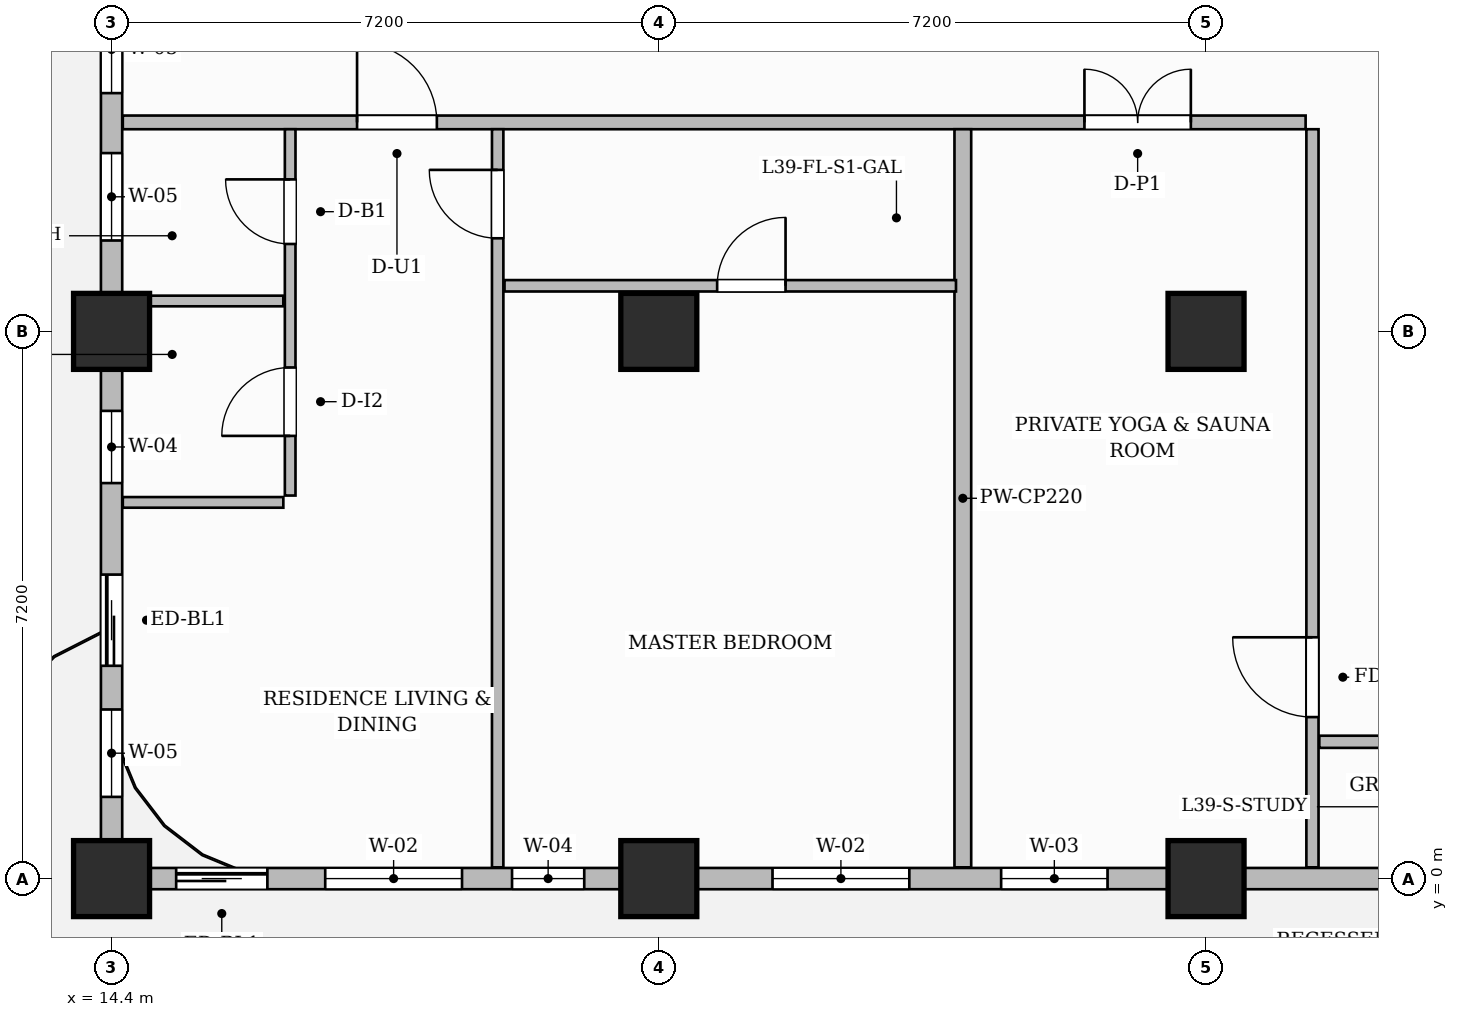
"""IFC4 building model, lengths in metres.
Left out: names, types, materials, properties, quantities, classifications, styles, units other than length and angle.
Written with IfcOpenShell. Run it as: python <this file> out.ifc"""

import sys

from ifc_helpers import new_model, si_unit, direction, frame, frame_2d, origin, origin_2d, place, context, subcontext, project, spatial, rectangle, extrude, source, transform, mapped, element, fill, save


model = new_model("IFC4")
c1 = context("Model", 3, precision=1e-05, world=origin(), true_north=direction((0.0, 1.0)))
c2 = subcontext(c1, "Body", "Model", "MODEL_VIEW")
j1 = project(units=[si_unit("LENGTHUNIT", "METRE"), si_unit("PLANEANGLEUNIT", "RADIAN")], contexts=[c1])
p1 = place(None, origin())
s1 = spatial("IfcSite", under=j1, at=p1, CompositionType="ELEMENT")
p2 = place(p1, origin())
s2 = spatial("IfcBuilding", under=s1, at=p2, CompositionType="ELEMENT")
p3 = place(p2, frame((0.0, 0.0, 158.0)))
s3 = spatial("IfcBuildingStorey", under=s2, at=p3, CompositionType="ELEMENT", Elevation=158.0)
m1 = source(origin(), c2, "Body", "SweptSolid", [
    extrude(rectangle(XDim=1.0, YDim=1.0, at=origin_2d()), origin(), (0.0, 0.0, 1.0), 3.85),
])
for number, where, z_axis, x_axis in (
    (1, (14.4, 0.0, 0.0), (0.0, 0.0, 1.0), (1.0, 0.0, 0.0)),
    (2, (14.4, 7.2, 0.0), (0.0, 0.0, 1.0), (1.0, 0.0, 0.0)),
    (3, (21.6, 0.0, 0.0), (0.0, 0.0, 1.0), (1.0, 0.0, 0.0)),
    (4, (21.6, 7.2, 0.0), (0.0, 0.0, 1.0), (1.0, 0.0, 0.0)),
    (5, (28.8, 0.0, 0.0), (0.0, 0.0, 1.0), (1.0, 0.0, 0.0)),
    (6, (28.8, 7.2, 0.0), (0.0, 0.0, 1.0), (1.0, 0.0, 0.0)),
):
    element("IfcColumn", number, at=place(p3, frame(where, z_axis=z_axis, x_axis=x_axis)), inside=s3, PredefinedType="COLUMN", context=c2, shape_type="MappedRepresentation", body=[
        mapped(m1, transform((0.0, 0.0, 0.0), scale=1.0)),
    ])
p4 = place(p3, frame((14.548, 9.95, 0.0), z_axis=(0.0, 0.0, 1.0), x_axis=(1.0, 0.0, 0.0)))
e7 = element("IfcWall", 7, at=p4, inside=s3, PredefinedType="PARTITIONING", context=c2, shape_type="SweptSolid", body=[
    extrude(rectangle(XDim=15.562, YDim=0.18, at=frame_2d((7.781, 0.0))), origin(), (0.0, 0.0, 1.0), 3.6),
])
p5 = place(p4, frame((3.082, 0.0, 0.0)))
e8 = element("IfcOpeningElement", 8, at=p5, cuts=e7, PredefinedType="OPENING", context=c2, shape_type="SweptSolid", body=[
    extrude(rectangle(XDim=1.05, YDim=2.25, at=frame_2d((0.525, 1.125))), frame((0.0, 0.1, 0.0), z_axis=(0.0, -1.0, 0.0), x_axis=(1.0, 0.0, 0.0)), (0.0, 0.0, 1.0), 0.2),
])
p6 = place(p4, frame((12.652, 0.0, 0.0)))
e9 = element("IfcOpeningElement", 9, at=p6, cuts=e7, PredefinedType="OPENING", context=c2, shape_type="SweptSolid", body=[
    extrude(rectangle(XDim=1.4, YDim=2.35, at=frame_2d((0.7, 1.175))), frame((0.0, 0.1, 0.0), z_axis=(0.0, -1.0, 0.0), x_axis=(1.0, 0.0, 0.0)), (0.0, 0.0, 1.0), 0.2),
])
p7 = place(p3, frame((30.2, 0.148, 0.0), z_axis=(0.0, 0.0, 1.0), x_axis=(0.0, 1.0, 0.0)))
e10 = element("IfcWall", 10, at=p7, inside=s3, PredefinedType="PARTITIONING", context=c2, shape_type="SweptSolid", body=[
    extrude(rectangle(XDim=9.712, YDim=0.16, at=frame_2d((4.856, 0.0))), origin(), (0.0, 0.0, 1.0), 3.6),
])
p8 = place(p7, frame((1.977, 0.0, 0.0)))
e11 = element("IfcOpeningElement", 11, at=p8, cuts=e10, PredefinedType="OPENING", context=c2, shape_type="SweptSolid", body=[
    extrude(rectangle(XDim=1.05, YDim=2.15, at=frame_2d((0.525, 1.075))), frame((0.0, 0.09, 0.0), z_axis=(0.0, -1.0, 0.0), x_axis=(1.0, 0.0, 0.0)), (0.0, 0.0, 1.0), 0.18),
])
p9 = place(p3, frame((30.29, 1.8, 0.0), z_axis=(0.0, 0.0, 1.0), x_axis=(1.0, 0.0, 0.0)))
e12 = element("IfcWall", 12, at=p9, inside=s3, PredefinedType="PARTITIONING", context=c2, shape_type="SweptSolid", body=[
    extrude(rectangle(XDim=19.37, YDim=0.16, at=frame_2d((9.685, 0.0))), origin(), (0.0, 0.0, 1.0), 3.6),
])
p10 = place(p9, frame((5.074, 0.0, 0.0)))
e13 = element("IfcOpeningElement", 13, at=p10, cuts=e12, PredefinedType="OPENING", context=c2, shape_type="SweptSolid", body=[
    extrude(rectangle(XDim=0.9, YDim=2.15, at=frame_2d((0.45, 1.075))), frame((0.0, 0.09, 0.0), z_axis=(0.0, -1.0, 0.0), x_axis=(1.0, 0.0, 0.0)), (0.0, 0.0, 1.0), 0.18),
])
p11 = place(p9, frame((14.06, 0.0, 0.0)))
e14 = element("IfcOpeningElement", 14, at=p11, cuts=e12, PredefinedType="OPENING", context=c2, shape_type="SweptSolid", body=[
    extrude(rectangle(XDim=0.9, YDim=2.15, at=frame_2d((0.45, 1.075))), frame((0.0, 0.09, 0.0), z_axis=(0.0, -1.0, 0.0), x_axis=(1.0, 0.0, 0.0)), (0.0, 0.0, 1.0), 0.18),
])
p12 = place(p3, frame((25.6, 0.148, 0.0), z_axis=(0.0, 0.0, 1.0), x_axis=(0.0, 1.0, 0.0)))
e15 = element("IfcWall", 15, at=p12, inside=s3, PredefinedType="PARTITIONING", context=c2, shape_type="SweptSolid", body=[
    extrude(rectangle(XDim=9.712, YDim=0.22, at=frame_2d((4.856, 0.0))), origin(), (0.0, 0.0, 1.0), 3.6),
])
p13 = place(p3, frame((16.75, 5.04, 0.0), z_axis=(0.0, 0.0, 1.0), x_axis=(0.0, 1.0, 0.0)))
e16 = element("IfcWall", 16, at=p13, inside=s3, PredefinedType="PARTITIONING", context=c2, shape_type="SweptSolid", body=[
    extrude(rectangle(XDim=4.82, YDim=0.14, at=frame_2d((2.41, 0.0))), origin(), (0.0, 0.0, 1.0), 3.6),
])
p14 = place(p13, frame((0.785, 0.0, 0.0)))
e17 = element("IfcOpeningElement", 17, at=p14, cuts=e16, PredefinedType="OPENING", context=c2, shape_type="SweptSolid", body=[
    extrude(rectangle(XDim=0.9, YDim=2.15, at=frame_2d((0.45, 1.075))), frame((0.0, 0.08, 0.0), z_axis=(0.0, -1.0, 0.0), x_axis=(1.0, 0.0, 0.0)), (0.0, 0.0, 1.0), 0.16),
])
p15 = place(p13, frame((3.31, 0.0, 0.0)))
e18 = element("IfcOpeningElement", 18, at=p15, cuts=e16, PredefinedType="OPENING", context=c2, shape_type="SweptSolid", body=[
    extrude(rectangle(XDim=0.85, YDim=2.1, at=frame_2d((0.425, 1.05))), frame((0.0, 0.08, 0.0), z_axis=(0.0, -1.0, 0.0), x_axis=(1.0, 0.0, 0.0)), (0.0, 0.0, 1.0), 0.16),
])
p16 = place(p3, frame((14.59, 7.6, 0.0), z_axis=(0.0, 0.0, 1.0), x_axis=(1.0, 0.0, 0.0)))
e19 = element("IfcWall", 19, at=p16, inside=s3, PredefinedType="PARTITIONING", context=c2, shape_type="SweptSolid", body=[
    extrude(rectangle(XDim=2.07, YDim=0.14, at=frame_2d((1.035, 0.0))), origin(), (0.0, 0.0, 1.0), 3.6),
])
p17 = place(p3, frame((14.548, 4.95, 0.0), z_axis=(0.0, 0.0, 1.0), x_axis=(1.0, 0.0, 0.0)))
e20 = element("IfcWall", 20, at=p17, inside=s3, PredefinedType="PARTITIONING", context=c2, shape_type="SweptSolid", body=[
    extrude(rectangle(XDim=2.112, YDim=0.14, at=frame_2d((1.056, 0.0))), origin(), (0.0, 0.0, 1.0), 3.6),
])
p18 = place(p3, frame((19.48, 0.148, 0.0), z_axis=(0.0, 0.0, 1.0), x_axis=(0.0, 1.0, 0.0)))
e21 = element("IfcWall", 21, at=p18, inside=s3, PredefinedType="PARTITIONING", context=c2, shape_type="SweptSolid", body=[
    extrude(rectangle(XDim=9.712, YDim=0.15, at=frame_2d((4.856, 0.0))), origin(), (0.0, 0.0, 1.0), 3.6),
])
p19 = place(p18, frame((8.277, 0.0, 0.0)))
e22 = element("IfcOpeningElement", 22, at=p19, cuts=e21, PredefinedType="OPENING", context=c2, shape_type="SweptSolid", body=[
    extrude(rectangle(XDim=0.9, YDim=2.15, at=frame_2d((0.45, 1.075))), frame((0.0, 0.085, 0.0), z_axis=(0.0, -1.0, 0.0), x_axis=(1.0, 0.0, 0.0)), (0.0, 0.0, 1.0), 0.17),
])
p20 = place(p3, frame((19.57, 7.8, 0.0), z_axis=(0.0, 0.0, 1.0), x_axis=(1.0, 0.0, 0.0)))
e23 = element("IfcWall", 23, at=p20, inside=s3, PredefinedType="PARTITIONING", context=c2, shape_type="SweptSolid", body=[
    extrude(rectangle(XDim=5.94, YDim=0.15, at=frame_2d((2.97, 0.0))), origin(), (0.0, 0.0, 1.0), 3.6),
])
p21 = place(p20, frame((2.798, 0.0, 0.0)))
e24 = element("IfcOpeningElement", 24, at=p21, cuts=e23, PredefinedType="OPENING", context=c2, shape_type="SweptSolid", body=[
    extrude(rectangle(XDim=0.9, YDim=2.15, at=frame_2d((0.45, 1.075))), frame((0.0, 0.085, 0.0), z_axis=(0.0, -1.0, 0.0), x_axis=(1.0, 0.0, 0.0)), (0.0, 0.0, 1.0), 0.17),
])
p22 = place(p3, frame((14.4, 0.0, 0.0), z_axis=(0.0, 0.0, 1.0), x_axis=(1.0, 0.0, 0.0)))
e25 = element("IfcWall", 25, at=p22, inside=s3, PredefinedType="SOLIDWALL", context=c2, shape_type="SweptSolid", body=[
    extrude(rectangle(XDim=35.4, YDim=0.28, at=frame_2d((17.7, 0.0))), origin(), (0.0, 0.0, 1.0), 3.085),
])
p23 = place(p22, frame((0.85, 0.0, 0.0)))
e26 = element("IfcOpeningElement", 26, at=p23, cuts=e25, PredefinedType="OPENING", context=c2, shape_type="SweptSolid", body=[
    extrude(rectangle(XDim=1.2, YDim=2.2, at=frame_2d((0.6, 1.1))), frame((0.0, 0.15, 0.0), z_axis=(0.0, -1.0, 0.0), x_axis=(1.0, 0.0, 0.0)), (0.0, 0.0, 1.0), 0.3),
])
p24 = place(p22, frame((2.811, 0.0, 0.8)))
e27 = element("IfcOpeningElement", 27, at=p24, cuts=e25, PredefinedType="OPENING", context=c2, shape_type="SweptSolid", body=[
    extrude(rectangle(XDim=1.8, YDim=1.85, at=frame_2d((0.9, 0.925))), frame((0.0, 0.15, 0.0), z_axis=(0.0, -1.0, 0.0), x_axis=(1.0, 0.0, 0.0)), (0.0, 0.0, 1.0), 0.3),
])
p25 = place(p22, frame((5.269, 0.0, 0.8)))
e28 = element("IfcOpeningElement", 28, at=p25, cuts=e25, PredefinedType="OPENING", context=c2, shape_type="SweptSolid", body=[
    extrude(rectangle(XDim=0.95, YDim=1.75, at=frame_2d((0.475, 0.875))), frame((0.0, 0.15, 0.0), z_axis=(0.0, -1.0, 0.0), x_axis=(1.0, 0.0, 0.0)), (0.0, 0.0, 1.0), 0.3),
])
p26 = place(p22, frame((8.696, 0.0, 0.8)))
e29 = element("IfcOpeningElement", 29, at=p26, cuts=e25, PredefinedType="OPENING", context=c2, shape_type="SweptSolid", body=[
    extrude(rectangle(XDim=1.8, YDim=1.85, at=frame_2d((0.9, 0.925))), frame((0.0, 0.15, 0.0), z_axis=(0.0, -1.0, 0.0), x_axis=(1.0, 0.0, 0.0)), (0.0, 0.0, 1.0), 0.3),
])
p27 = place(p22, frame((11.704, 0.0, 0.8)))
e30 = element("IfcOpeningElement", 30, at=p27, cuts=e25, PredefinedType="OPENING", context=c2, shape_type="SweptSolid", body=[
    extrude(rectangle(XDim=1.4, YDim=1.85, at=frame_2d((0.7, 0.925))), frame((0.0, 0.15, 0.0), z_axis=(0.0, -1.0, 0.0), x_axis=(1.0, 0.0, 0.0)), (0.0, 0.0, 1.0), 0.3),
])
p28 = place(p22, frame((16.804, 0.0, 0.8)))
e31 = element("IfcOpeningElement", 31, at=p28, cuts=e25, PredefinedType="OPENING", context=c2, shape_type="SweptSolid", body=[
    extrude(rectangle(XDim=1.8, YDim=1.85, at=frame_2d((0.9, 0.925))), frame((0.0, 0.15, 0.0), z_axis=(0.0, -1.0, 0.0), x_axis=(1.0, 0.0, 0.0)), (0.0, 0.0, 1.0), 0.3),
])
p29 = place(p22, frame((22.396, 0.0, 0.8)))
e32 = element("IfcOpeningElement", 32, at=p29, cuts=e25, PredefinedType="OPENING", context=c2, shape_type="SweptSolid", body=[
    extrude(rectangle(XDim=1.8, YDim=1.85, at=frame_2d((0.9, 0.925))), frame((0.0, 0.15, 0.0), z_axis=(0.0, -1.0, 0.0), x_axis=(1.0, 0.0, 0.0)), (0.0, 0.0, 1.0), 0.3),
])
p30 = place(p22, frame((25.629, 0.0, 0.8)))
e33 = element("IfcOpeningElement", 33, at=p30, cuts=e25, PredefinedType="OPENING", context=c2, shape_type="SweptSolid", body=[
    extrude(rectangle(XDim=0.95, YDim=1.75, at=frame_2d((0.475, 0.875))), frame((0.0, 0.15, 0.0), z_axis=(0.0, -1.0, 0.0), x_axis=(1.0, 0.0, 0.0)), (0.0, 0.0, 1.0), 0.3),
])
p31 = place(p22, frame((29.075, 0.0, 0.8)))
e34 = element("IfcOpeningElement", 34, at=p31, cuts=e25, PredefinedType="OPENING", context=c2, shape_type="SweptSolid", body=[
    extrude(rectangle(XDim=1.8, YDim=1.85, at=frame_2d((0.9, 0.925))), frame((0.0, 0.15, 0.0), z_axis=(0.0, -1.0, 0.0), x_axis=(1.0, 0.0, 0.0)), (0.0, 0.0, 1.0), 0.3),
])
p32 = place(p22, frame((32.125, 0.0, 0.8)))
e35 = element("IfcOpeningElement", 35, at=p32, cuts=e25, PredefinedType="OPENING", context=c2, shape_type="SweptSolid", body=[
    extrude(rectangle(XDim=1.8, YDim=1.85, at=frame_2d((0.9, 0.925))), frame((0.0, 0.15, 0.0), z_axis=(0.0, -1.0, 0.0), x_axis=(1.0, 0.0, 0.0)), (0.0, 0.0, 1.0), 0.3),
])
p33 = place(p3, frame((14.4, 0.05, 0.0), z_axis=(0.0, 0.0, 1.0), x_axis=(0.0, 1.0, 0.0)))
e36 = element("IfcWall", 36, at=p33, inside=s3, PredefinedType="SOLIDWALL", context=c2, shape_type="SweptSolid", body=[
    extrude(rectangle(XDim=20.6, YDim=0.28, at=frame_2d((10.3, 0.0))), origin(), (0.0, 0.0, 1.0), 3.085),
])
p34 = place(p33, frame((2.75, 0.0, 0.0)))
e37 = element("IfcOpeningElement", 37, at=p34, cuts=e36, PredefinedType="OPENING", context=c2, shape_type="SweptSolid", body=[
    extrude(rectangle(XDim=1.2, YDim=2.2, at=frame_2d((0.6, 1.1))), frame((0.0, 0.15, 0.0), z_axis=(0.0, -1.0, 0.0), x_axis=(1.0, 0.0, 0.0)), (0.0, 0.0, 1.0), 0.3),
])
p35 = place(p33, frame((1.025, 0.0, 0.8)))
e38 = element("IfcOpeningElement", 38, at=p35, cuts=e36, PredefinedType="OPENING", context=c2, shape_type="SweptSolid", body=[
    extrude(rectangle(XDim=1.15, YDim=1.8, at=frame_2d((0.575, 0.9))), frame((0.0, 0.15, 0.0), z_axis=(0.0, -1.0, 0.0), x_axis=(1.0, 0.0, 0.0)), (0.0, 0.0, 1.0), 0.3),
])
p36 = place(p33, frame((5.154, 0.0, 0.8)))
e39 = element("IfcOpeningElement", 39, at=p36, cuts=e36, PredefinedType="OPENING", context=c2, shape_type="SweptSolid", body=[
    extrude(rectangle(XDim=0.95, YDim=1.75, at=frame_2d((0.475, 0.875))), frame((0.0, 0.15, 0.0), z_axis=(0.0, -1.0, 0.0), x_axis=(1.0, 0.0, 0.0)), (0.0, 0.0, 1.0), 0.3),
])
p37 = place(p33, frame((8.346, 0.0, 0.8)))
e40 = element("IfcOpeningElement", 40, at=p37, cuts=e36, PredefinedType="OPENING", context=c2, shape_type="SweptSolid", body=[
    extrude(rectangle(XDim=1.15, YDim=1.8, at=frame_2d((0.575, 0.9))), frame((0.0, 0.15, 0.0), z_axis=(0.0, -1.0, 0.0), x_axis=(1.0, 0.0, 0.0)), (0.0, 0.0, 1.0), 0.3),
])
p38 = place(p33, frame((10.285, 0.0, 0.8)))
e41 = element("IfcOpeningElement", 41, at=p38, cuts=e36, PredefinedType="OPENING", context=c2, shape_type="SweptSolid", body=[
    extrude(rectangle(XDim=1.15, YDim=1.8, at=frame_2d((0.575, 0.9))), frame((0.0, 0.15, 0.0), z_axis=(0.0, -1.0, 0.0), x_axis=(1.0, 0.0, 0.0)), (0.0, 0.0, 1.0), 0.3),
])
p39 = place(p33, frame((12.114, 0.0, 0.8)))
e42 = element("IfcOpeningElement", 42, at=p39, cuts=e36, PredefinedType="OPENING", context=c2, shape_type="SweptSolid", body=[
    extrude(rectangle(XDim=1.15, YDim=1.8, at=frame_2d((0.575, 0.9))), frame((0.0, 0.15, 0.0), z_axis=(0.0, -1.0, 0.0), x_axis=(1.0, 0.0, 0.0)), (0.0, 0.0, 1.0), 0.3),
])
p40 = place(p33, frame((16.79, 0.0, 0.8)))
e43 = element("IfcOpeningElement", 43, at=p40, cuts=e36, PredefinedType="OPENING", context=c2, shape_type="SweptSolid", body=[
    extrude(rectangle(XDim=1.8, YDim=1.85, at=frame_2d((0.9, 0.925))), frame((0.0, 0.15, 0.0), z_axis=(0.0, -1.0, 0.0), x_axis=(1.0, 0.0, 0.0)), (0.0, 0.0, 1.0), 0.3),
])
m2 = source(origin(), c2, "Body", "SweptSolid", [
    extrude(rectangle(XDim=1.05, YDim=2.15, at=frame_2d((0.525, 1.075))), frame((0.0, 0.025, 0.0), z_axis=(0.0, -1.0, 0.0), x_axis=(1.0, 0.0, 0.0)), (0.0, 0.0, 1.0), 0.05),
])
p41 = place(p8, origin())
e44 = element("IfcDoor", 44, at=p41, inside=s3, OperationType="SINGLE_SWING_RIGHT", PredefinedType="DOOR", context=c2, shape_type="MappedRepresentation", body=[
    mapped(m2, transform((0.0, 0.0, 0.0), scale=1.0)),
])
fill(e11, e44)
m3 = source(origin(), c2, "Body", "SweptSolid", [
    extrude(rectangle(XDim=0.9, YDim=2.15, at=frame_2d((0.45, 1.075))), frame((0.0, 0.025, 0.0), z_axis=(0.0, -1.0, 0.0), x_axis=(1.0, 0.0, 0.0)), (0.0, 0.0, 1.0), 0.05),
])
p42 = place(p14, origin())
e45 = element("IfcDoor", 45, at=p42, inside=s3, OperationType="SINGLE_SWING_LEFT", PredefinedType="DOOR", context=c2, shape_type="MappedRepresentation", body=[
    mapped(m3, transform((0.0, 0.0, 0.0), scale=1.0)),
])
fill(e17, e45)
m4 = source(origin(), c2, "Body", "SweptSolid", [
    extrude(rectangle(XDim=0.85, YDim=2.1, at=frame_2d((0.425, 1.05))), frame((0.0, 0.025, 0.0), z_axis=(0.0, -1.0, 0.0), x_axis=(1.0, 0.0, 0.0)), (0.0, 0.0, 1.0), 0.05),
])
p43 = place(p15, origin())
e46 = element("IfcDoor", 46, at=p43, inside=s3, OperationType="SINGLE_SWING_RIGHT", PredefinedType="DOOR", context=c2, shape_type="MappedRepresentation", body=[
    mapped(m4, transform((0.0, 0.0, 0.0), scale=1.0)),
])
fill(e18, e46)
m5 = source(origin(), c2, "Body", "SweptSolid", [
    extrude(rectangle(XDim=1.05, YDim=2.25, at=frame_2d((0.525, 1.125))), frame((0.0, 0.025, 0.0), z_axis=(0.0, -1.0, 0.0), x_axis=(1.0, 0.0, 0.0)), (0.0, 0.0, 1.0), 0.05),
])
p44 = place(p5, origin())
e47 = element("IfcDoor", 47, at=p44, inside=s3, OperationType="SINGLE_SWING_LEFT", PredefinedType="DOOR", context=c2, shape_type="MappedRepresentation", body=[
    mapped(m5, transform((0.0, 0.0, 0.0), scale=1.0)),
])
fill(e8, e47)
p45 = place(p19, origin())
e48 = element("IfcDoor", 48, at=p45, inside=s3, OperationType="SINGLE_SWING_RIGHT", PredefinedType="DOOR", context=c2, shape_type="MappedRepresentation", body=[
    mapped(m3, transform((0.0, 0.0, 0.0), scale=1.0)),
])
fill(e22, e48)
p46 = place(p21, origin())
e49 = element("IfcDoor", 49, at=p46, inside=s3, OperationType="SINGLE_SWING_RIGHT", PredefinedType="DOOR", context=c2, shape_type="MappedRepresentation", body=[
    mapped(m3, transform((0.0, 0.0, 0.0), scale=1.0)),
])
fill(e24, e49)
m6 = source(origin(), c2, "Body", "SweptSolid", [
    extrude(rectangle(XDim=1.4, YDim=2.35, at=frame_2d((0.7, 1.175))), frame((0.0, 0.025, 0.0), z_axis=(0.0, -1.0, 0.0), x_axis=(1.0, 0.0, 0.0)), (0.0, 0.0, 1.0), 0.05),
])
p47 = place(p6, origin())
e50 = element("IfcDoor", 50, at=p47, inside=s3, OperationType="DOUBLE_DOOR_SINGLE_SWING", PredefinedType="DOOR", context=c2, shape_type="MappedRepresentation", body=[
    mapped(m6, transform((0.0, 0.0, 0.0), scale=1.0)),
])
fill(e9, e50)
m7 = source(origin(), c2, "Body", "SweptSolid", [
    extrude(rectangle(XDim=1.2, YDim=2.2, at=frame_2d((0.6, 1.1))), frame((0.0, 0.025, 0.0), z_axis=(0.0, -1.0, 0.0), x_axis=(1.0, 0.0, 0.0)), (0.0, 0.0, 1.0), 0.05),
])
p48 = place(p23, origin())
e51 = element("IfcDoor", 51, at=p48, inside=s3, OperationType="SLIDING_TO_LEFT", PredefinedType="DOOR", context=c2, shape_type="MappedRepresentation", body=[
    mapped(m7, transform((0.0, 0.0, 0.0), scale=1.0)),
])
fill(e26, e51)
p49 = place(p34, origin())
e52 = element("IfcDoor", 52, at=p49, inside=s3, OperationType="SLIDING_TO_LEFT", PredefinedType="DOOR", context=c2, shape_type="MappedRepresentation", body=[
    mapped(m7, transform((0.0, 0.0, 0.0), scale=1.0)),
])
fill(e37, e52)
m8 = source(origin(), c2, "Body", "SweptSolid", [
    extrude(rectangle(XDim=1.8, YDim=1.85, at=frame_2d((0.9, 0.925))), frame((0.0, 0.03, 0.0), z_axis=(0.0, -1.0, 0.0), x_axis=(1.0, 0.0, 0.0)), (0.0, 0.0, 1.0), 0.06),
])
p50 = place(p24, origin())
e53 = element("IfcWindow", 53, at=p50, inside=s3, PartitioningType="DOUBLE_PANEL_VERTICAL", PredefinedType="WINDOW", context=c2, shape_type="MappedRepresentation", body=[
    mapped(m8, transform((0.0, 0.0, 0.0), scale=1.0)),
])
fill(e27, e53)
m9 = source(origin(), c2, "Body", "SweptSolid", [
    extrude(rectangle(XDim=0.95, YDim=1.75, at=frame_2d((0.475, 0.875))), frame((0.0, 0.03, 0.0), z_axis=(0.0, -1.0, 0.0), x_axis=(1.0, 0.0, 0.0)), (0.0, 0.0, 1.0), 0.06),
])
p51 = place(p25, origin())
e54 = element("IfcWindow", 54, at=p51, inside=s3, PartitioningType="SINGLE_PANEL", PredefinedType="WINDOW", context=c2, shape_type="MappedRepresentation", body=[
    mapped(m9, transform((0.0, 0.0, 0.0), scale=1.0)),
])
fill(e28, e54)
p52 = place(p26, origin())
e55 = element("IfcWindow", 55, at=p52, inside=s3, PartitioningType="DOUBLE_PANEL_VERTICAL", PredefinedType="WINDOW", context=c2, shape_type="MappedRepresentation", body=[
    mapped(m8, transform((0.0, 0.0, 0.0), scale=1.0)),
])
fill(e29, e55)
m10 = source(origin(), c2, "Body", "SweptSolid", [
    extrude(rectangle(XDim=1.4, YDim=1.85, at=frame_2d((0.7, 0.925))), frame((0.0, 0.03, 0.0), z_axis=(0.0, -1.0, 0.0), x_axis=(1.0, 0.0, 0.0)), (0.0, 0.0, 1.0), 0.06),
])
p53 = place(p27, origin())
e56 = element("IfcWindow", 56, at=p53, inside=s3, PartitioningType="SINGLE_PANEL", PredefinedType="WINDOW", context=c2, shape_type="MappedRepresentation", body=[
    mapped(m10, transform((0.0, 0.0, 0.0), scale=1.0)),
])
fill(e30, e56)
m11 = source(origin(), c2, "Body", "SweptSolid", [
    extrude(rectangle(XDim=1.15, YDim=1.8, at=frame_2d((0.575, 0.9))), frame((0.0, 0.03, 0.0), z_axis=(0.0, -1.0, 0.0), x_axis=(1.0, 0.0, 0.0)), (0.0, 0.0, 1.0), 0.06),
])
p54 = place(p35, origin())
e57 = element("IfcWindow", 57, at=p54, inside=s3, PartitioningType="SINGLE_PANEL", PredefinedType="WINDOW", context=c2, shape_type="MappedRepresentation", body=[
    mapped(m11, transform((0.0, 0.0, 0.0), scale=1.0)),
])
fill(e38, e57)
p55 = place(p36, origin())
e58 = element("IfcWindow", 58, at=p55, inside=s3, PartitioningType="SINGLE_PANEL", PredefinedType="WINDOW", context=c2, shape_type="MappedRepresentation", body=[
    mapped(m9, transform((0.0, 0.0, 0.0), scale=1.0)),
])
fill(e39, e58)
p56 = place(p37, origin())
e59 = element("IfcWindow", 59, at=p56, inside=s3, PartitioningType="SINGLE_PANEL", PredefinedType="WINDOW", context=c2, shape_type="MappedRepresentation", body=[
    mapped(m11, transform((0.0, 0.0, 0.0), scale=1.0)),
])
fill(e40, e59)
p57 = place(p38, origin())
e60 = element("IfcWindow", 60, at=p57, inside=s3, PartitioningType="SINGLE_PANEL", PredefinedType="WINDOW", context=c2, shape_type="MappedRepresentation", body=[
    mapped(m11, transform((0.0, 0.0, 0.0), scale=1.0)),
])
fill(e41, e60)
save(model, sys.argv[1])
